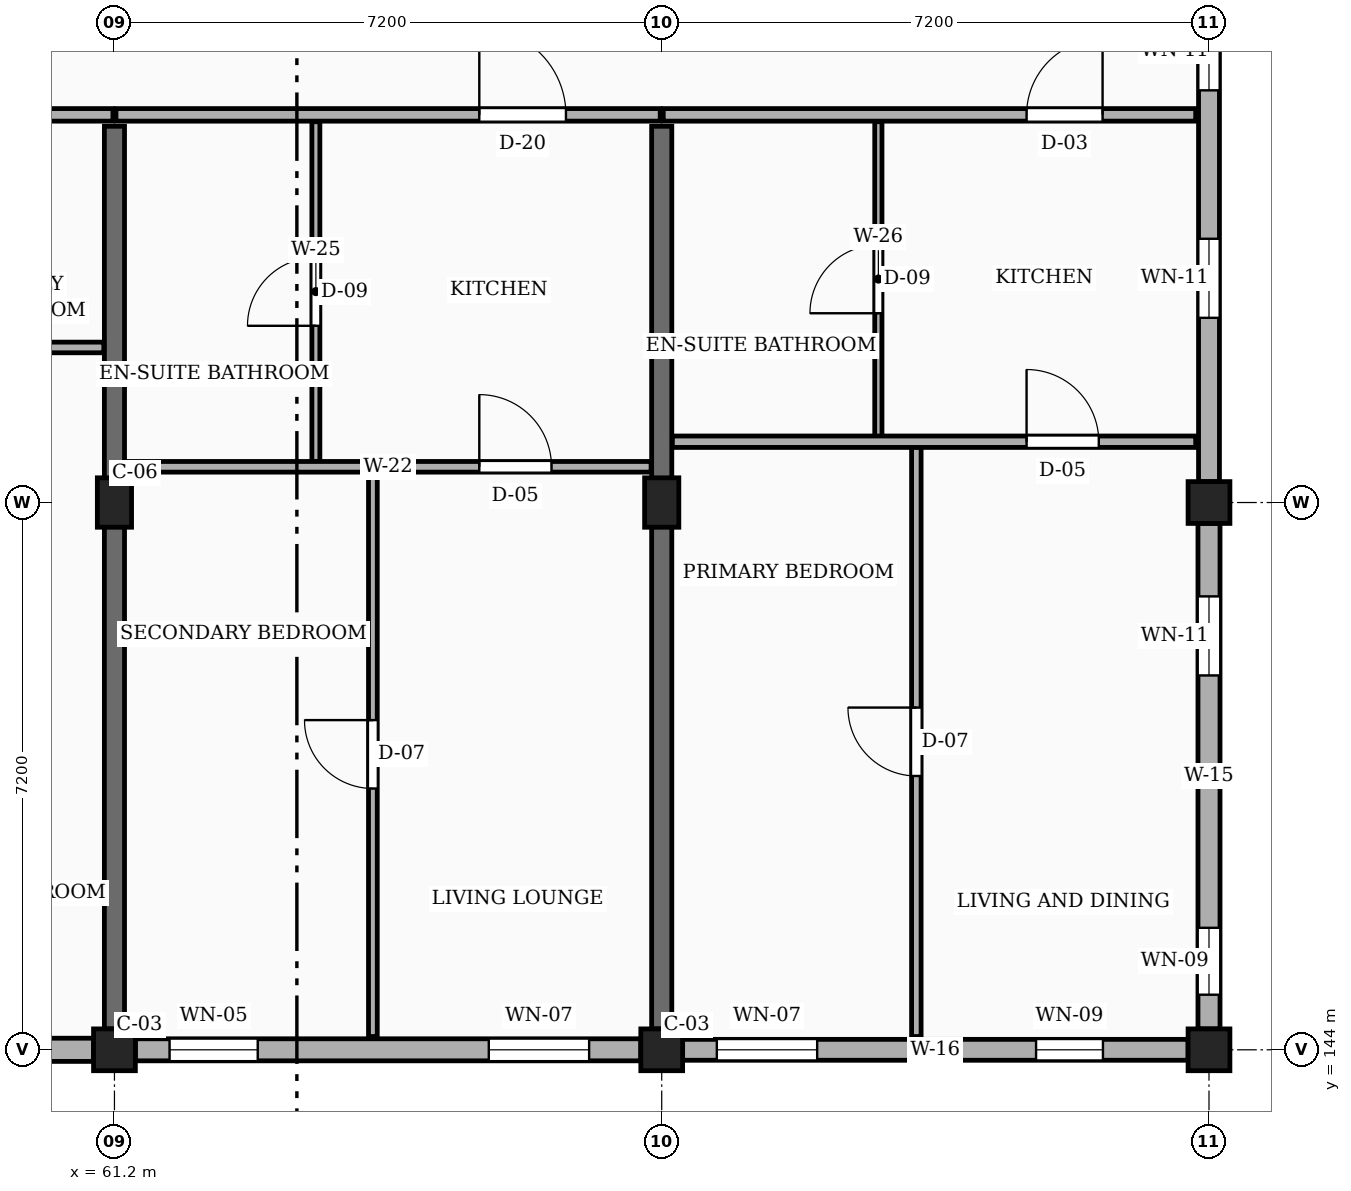
"""IFC4 building model, lengths in metres.
Left out: names, types, materials, properties, quantities, classifications, styles, units other than length and angle.
Written with IfcOpenShell. Run it as: python <this file> out.ifc"""

import sys

from ifc_helpers import new_model, si_unit, direction, frame, frame_2d, origin, origin_2d, place, context, subcontext, project, spatial, rectangle, extrude, element, fill, save


model = new_model("IFC4")
c1 = context("Model", 3, precision=1e-05, world=origin(), true_north=direction((0.0, 1.0)))
c2 = subcontext(c1, "Body", "Model", "MODEL_VIEW")
j1 = project(units=[si_unit("LENGTHUNIT", "METRE"), si_unit("PLANEANGLEUNIT", "RADIAN")], contexts=[c1])
p1 = place(None, origin())
s1 = spatial("IfcSite", under=j1, at=p1, CompositionType="ELEMENT")
p2 = place(p1, origin())
s2 = spatial("IfcBuilding", under=s1, at=p2, CompositionType="ELEMENT")
p3 = place(p2, frame((0.0, 0.0, 10.8)))
s3 = spatial("IfcBuildingStorey", under=s2, at=p3, CompositionType="ELEMENT", Elevation=10.8)
p4 = place(p3, frame((61.2, 144.0, 0.0), z_axis=(0.0, 0.0, 1.0), x_axis=(1.0, 0.0, 0.0)))
e1 = element("IfcColumn", 1, at=p4, inside=s3, PredefinedType="COLUMN", context=c2, shape_type="SweptSolid", body=[
    extrude(rectangle(XDim=0.55, YDim=0.55, at=origin_2d()), origin(), (0.0, 0.0, 1.0), 3.15),
])
p5 = place(p3, frame((61.2, 151.2, 0.0), z_axis=(0.0, 0.0, 1.0), x_axis=(1.0, 0.0, 0.0)))
e2 = element("IfcColumn", 2, at=p5, inside=s3, PredefinedType="COLUMN", context=c2, shape_type="SweptSolid", body=[
    extrude(rectangle(XDim=0.45, YDim=0.65, at=origin_2d()), origin(), (0.0, 0.0, 1.0), 3.15),
])
p6 = place(p3, frame((68.4, 144.0, 0.0), z_axis=(0.0, 0.0, 1.0), x_axis=(1.0, 0.0, 0.0)))
e3 = element("IfcColumn", 3, at=p6, inside=s3, PredefinedType="COLUMN", context=c2, shape_type="SweptSolid", body=[
    extrude(rectangle(XDim=0.55, YDim=0.55, at=origin_2d()), origin(), (0.0, 0.0, 1.0), 3.15),
])
p7 = place(p3, frame((68.4, 151.2, 0.0), z_axis=(0.0, 0.0, 1.0), x_axis=(1.0, 0.0, 0.0)))
e4 = element("IfcColumn", 4, at=p7, inside=s3, PredefinedType="COLUMN", context=c2, shape_type="SweptSolid", body=[
    extrude(rectangle(XDim=0.45, YDim=0.65, at=origin_2d()), origin(), (0.0, 0.0, 1.0), 3.15),
])
for number, where, z_axis, x_axis in (
    (5, (75.6, 144.0, 0.0), (0.0, 0.0, 1.0), (1.0, 0.0, 0.0)),
    (6, (75.6, 151.2, 0.0), (0.0, 0.0, 1.0), (1.0, 0.0, 0.0)),
):
    element("IfcColumn", number, at=place(p3, frame(where, z_axis=z_axis, x_axis=x_axis)), inside=s3, PredefinedType="COLUMN", context=c2, shape_type="SweptSolid", body=[
        extrude(rectangle(XDim=0.55, YDim=0.55, at=origin_2d()), origin(), (0.0, 0.0, 1.0), 3.15),
    ])
for number, where, z_axis, x_axis in (
    (7, (61.2, 144.275, 0.0), (0.0, 0.0, 1.0), (0.0, 1.0, 0.0)),
    (8, (68.4, 144.275, 0.0), (0.0, 0.0, 1.0), (0.0, 1.0, 0.0)),
):
    element("IfcWall", number, at=place(p3, frame(where, z_axis=z_axis, x_axis=x_axis)), inside=s3, PredefinedType="SOLIDWALL", context=c2, shape_type="SweptSolid", body=[
        extrude(rectangle(XDim=11.875, YDim=0.265, at=frame_2d((5.938, 0.0))), origin(), (0.0, 0.0, 1.0), 2.185),
    ])
p8 = place(p3, frame((54.275, 144.0, 0.0), z_axis=(0.0, 0.0, 1.0), x_axis=(1.0, 0.0, 0.0)))
e9 = element("IfcWall", 9, at=p8, inside=s3, PredefinedType="SOLIDWALL", context=c2, shape_type="SweptSolid", body=[
    extrude(rectangle(XDim=6.65, YDim=0.305, at=frame_2d((3.325, 0.0))), origin(), (0.0, 0.0, 1.0), 2.455),
])
p9 = place(p8, frame((0.45, 0.0, 0.78)))
e10 = element("IfcOpeningElement", 10, at=p9, cuts=e9, PredefinedType="OPENING", context=c2, shape_type="SweptSolid", body=[
    extrude(rectangle(XDim=1.0, YDim=1.15, at=frame_2d((0.5, 0.575))), frame((0.0, 0.163, 0.0), z_axis=(0.0, -1.0, 0.0), x_axis=(1.0, 0.0, 0.0)), (0.0, 0.0, 1.0), 0.325),
])
p10 = place(p8, frame((4.65, 0.0, 0.78)))
e11 = element("IfcOpeningElement", 11, at=p10, cuts=e9, PredefinedType="OPENING", context=c2, shape_type="SweptSolid", body=[
    extrude(rectangle(XDim=1.16, YDim=1.15, at=frame_2d((0.58, 0.575))), frame((0.0, 0.163, 0.0), z_axis=(0.0, -1.0, 0.0), x_axis=(1.0, 0.0, 0.0)), (0.0, 0.0, 1.0), 0.325),
])
p11 = place(p3, frame((61.475, 144.0, 0.0), z_axis=(0.0, 0.0, 1.0), x_axis=(1.0, 0.0, 0.0)))
e12 = element("IfcWall", 12, at=p11, inside=s3, PredefinedType="SOLIDWALL", context=c2, shape_type="SweptSolid", body=[
    extrude(rectangle(XDim=6.65, YDim=0.29, at=frame_2d((3.325, 0.0))), origin(), (0.0, 0.0, 1.0), 2.455),
])
p12 = place(p11, frame((0.45, 0.0, 0.78)))
e13 = element("IfcOpeningElement", 13, at=p12, cuts=e12, PredefinedType="OPENING", context=c2, shape_type="SweptSolid", body=[
    extrude(rectangle(XDim=1.16, YDim=1.15, at=frame_2d((0.58, 0.575))), frame((0.0, 0.155, 0.0), z_axis=(0.0, -1.0, 0.0), x_axis=(1.0, 0.0, 0.0)), (0.0, 0.0, 1.0), 0.31),
])
p13 = place(p11, frame((4.65, 0.0, 0.78)))
e14 = element("IfcOpeningElement", 14, at=p13, cuts=e12, PredefinedType="OPENING", context=c2, shape_type="SweptSolid", body=[
    extrude(rectangle(XDim=1.32, YDim=1.15, at=frame_2d((0.66, 0.575))), frame((0.0, 0.155, 0.0), z_axis=(0.0, -1.0, 0.0), x_axis=(1.0, 0.0, 0.0)), (0.0, 0.0, 1.0), 0.31),
])
p14 = place(p3, frame((68.675, 144.0, 0.0), z_axis=(0.0, 0.0, 1.0), x_axis=(1.0, 0.0, 0.0)))
e15 = element("IfcWall", 15, at=p14, inside=s3, PredefinedType="SOLIDWALL", context=c2, shape_type="SweptSolid", body=[
    extrude(rectangle(XDim=6.65, YDim=0.275, at=frame_2d((3.325, 0.0))), origin(), (0.0, 0.0, 1.0), 2.455),
])
p15 = place(p14, frame((0.45, 0.0, 0.78)))
e16 = element("IfcOpeningElement", 16, at=p15, cuts=e15, PredefinedType="OPENING", context=c2, shape_type="SweptSolid", body=[
    extrude(rectangle(XDim=1.32, YDim=1.15, at=frame_2d((0.66, 0.575))), frame((0.0, 0.147, 0.0), z_axis=(0.0, -1.0, 0.0), x_axis=(1.0, 0.0, 0.0)), (0.0, 0.0, 1.0), 0.295),
])
p16 = place(p14, frame((4.65, 0.0, 0.78)))
e17 = element("IfcOpeningElement", 17, at=p16, cuts=e15, PredefinedType="OPENING", context=c2, shape_type="SweptSolid", body=[
    extrude(rectangle(XDim=0.88, YDim=1.26, at=frame_2d((0.44, 0.63))), frame((0.0, 0.147, 0.0), z_axis=(0.0, -1.0, 0.0), x_axis=(1.0, 0.0, 0.0)), (0.0, 0.0, 1.0), 0.295),
])
p17 = place(p3, frame((75.6, 144.275, 0.0), z_axis=(0.0, 0.0, 1.0), x_axis=(0.0, 1.0, 0.0)))
e18 = element("IfcWall", 18, at=p17, inside=s3, PredefinedType="SOLIDWALL", context=c2, shape_type="SweptSolid", body=[
    extrude(rectangle(XDim=6.65, YDim=0.29, at=frame_2d((3.325, 0.0))), origin(), (0.0, 0.0, 1.0), 2.455),
])
p18 = place(p17, frame((0.45, 0.0, 0.78)))
e19 = element("IfcOpeningElement", 19, at=p18, cuts=e18, PredefinedType="OPENING", context=c2, shape_type="SweptSolid", body=[
    extrude(rectangle(XDim=0.88, YDim=1.26, at=frame_2d((0.44, 0.63))), frame((0.0, 0.155, 0.0), z_axis=(0.0, -1.0, 0.0), x_axis=(1.0, 0.0, 0.0)), (0.0, 0.0, 1.0), 0.31),
])
p19 = place(p17, frame((4.65, 0.0, 0.78)))
e20 = element("IfcOpeningElement", 20, at=p19, cuts=e18, PredefinedType="OPENING", context=c2, shape_type="SweptSolid", body=[
    extrude(rectangle(XDim=1.04, YDim=1.26, at=frame_2d((0.52, 0.63))), frame((0.0, 0.155, 0.0), z_axis=(0.0, -1.0, 0.0), x_axis=(1.0, 0.0, 0.0)), (0.0, 0.0, 1.0), 0.31),
])
p20 = place(p3, frame((75.6, 151.475, 0.0), z_axis=(0.0, 0.0, 1.0), x_axis=(0.0, 1.0, 0.0)))
e21 = element("IfcWall", 21, at=p20, inside=s3, PredefinedType="SOLIDWALL", context=c2, shape_type="SweptSolid", body=[
    extrude(rectangle(XDim=6.65, YDim=0.275, at=frame_2d((3.325, 0.0))), origin(), (0.0, 0.0, 1.0), 2.455),
])
p21 = place(p20, frame((2.155, 0.0, 0.78)))
e22 = element("IfcOpeningElement", 22, at=p21, cuts=e21, PredefinedType="OPENING", context=c2, shape_type="SweptSolid", body=[
    extrude(rectangle(XDim=1.04, YDim=1.26, at=frame_2d((0.52, 0.63))), frame((0.0, 0.147, 0.0), z_axis=(0.0, -1.0, 0.0), x_axis=(1.0, 0.0, 0.0)), (0.0, 0.0, 1.0), 0.295),
])
p22 = place(p20, frame((5.147, 0.0, 0.78)))
e23 = element("IfcOpeningElement", 23, at=p22, cuts=e21, PredefinedType="OPENING", context=c2, shape_type="SweptSolid", body=[
    extrude(rectangle(XDim=1.04, YDim=1.26, at=frame_2d((0.52, 0.63))), frame((0.0, 0.147, 0.0), z_axis=(0.0, -1.0, 0.0), x_axis=(1.0, 0.0, 0.0)), (0.0, 0.0, 1.0), 0.295),
])
p23 = place(p3, frame((54.02, 156.3, 0.0), z_axis=(0.0, 0.0, 1.0), x_axis=(1.0, 0.0, 0.0)))
e24 = element("IfcWall", 24, at=p23, inside=s3, PredefinedType="PARTITIONING", context=c2, shape_type="SweptSolid", body=[
    extrude(rectangle(XDim=7.16, YDim=0.165, at=frame_2d((3.58, 0.0))), origin(), (0.0, 0.0, 1.0), 2.32),
])
p24 = place(p23, frame((1.33, 0.0, 0.0)))
e25 = element("IfcOpeningElement", 25, at=p24, cuts=e24, PredefinedType="OPENING", context=c2, shape_type="SweptSolid", body=[
    extrude(rectangle(XDim=0.94, YDim=2.12, at=frame_2d((0.47, 1.06))), frame((0.0, 0.093, 0.0), z_axis=(0.0, -1.0, 0.0), x_axis=(1.0, 0.0, 0.0)), (0.0, 0.0, 1.0), 0.185),
])
p25 = place(p3, frame((61.22, 156.3, 0.0), z_axis=(0.0, 0.0, 1.0), x_axis=(1.0, 0.0, 0.0)))
e26 = element("IfcWall", 26, at=p25, inside=s3, PredefinedType="PARTITIONING", context=c2, shape_type="SweptSolid", body=[
    extrude(rectangle(XDim=7.16, YDim=0.165, at=frame_2d((3.58, 0.0))), origin(), (0.0, 0.0, 1.0), 2.32),
])
p26 = place(p25, frame((4.78, 0.0, 0.0)))
e27 = element("IfcOpeningElement", 27, at=p26, cuts=e26, PredefinedType="OPENING", context=c2, shape_type="SweptSolid", body=[
    extrude(rectangle(XDim=1.14, YDim=2.18, at=frame_2d((0.57, 1.09))), frame((0.0, 0.093, 0.0), z_axis=(0.0, -1.0, 0.0), x_axis=(1.0, 0.0, 0.0)), (0.0, 0.0, 1.0), 0.185),
])
p27 = place(p3, frame((68.42, 156.3, 0.0), z_axis=(0.0, 0.0, 1.0), x_axis=(1.0, 0.0, 0.0)))
e28 = element("IfcWall", 28, at=p27, inside=s3, PredefinedType="PARTITIONING", context=c2, shape_type="SweptSolid", body=[
    extrude(rectangle(XDim=7.005, YDim=0.165, at=frame_2d((3.502, 0.0))), origin(), (0.0, 0.0, 1.0), 2.32),
])
p28 = place(p27, frame((4.78, 0.0, 0.0)))
e29 = element("IfcOpeningElement", 29, at=p28, cuts=e28, PredefinedType="OPENING", context=c2, shape_type="SweptSolid", body=[
    extrude(rectangle(XDim=1.0, YDim=2.15, at=frame_2d((0.5, 1.075))), frame((0.0, 0.093, 0.0), z_axis=(0.0, -1.0, 0.0), x_axis=(1.0, 0.0, 0.0)), (0.0, 0.0, 1.0), 0.185),
])
p29 = place(p3, frame((54.14, 153.24, 0.0), z_axis=(0.0, 0.0, 1.0), x_axis=(1.0, 0.0, 0.0)))
e30 = element("IfcWall", 30, at=p29, inside=s3, PredefinedType="PARTITIONING", context=c2, shape_type="SweptSolid", body=[
    extrude(rectangle(XDim=6.92, YDim=0.14, at=frame_2d((3.46, 0.0))), origin(), (0.0, 0.0, 1.0), 2.32),
])
p30 = place(p29, frame((1.31, 0.0, 0.0)))
e31 = element("IfcOpeningElement", 31, at=p30, cuts=e30, PredefinedType="OPENING", context=c2, shape_type="SweptSolid", body=[
    extrude(rectangle(XDim=0.92, YDim=2.1, at=frame_2d((0.46, 1.05))), frame((0.0, 0.08, 0.0), z_axis=(0.0, -1.0, 0.0), x_axis=(1.0, 0.0, 0.0)), (0.0, 0.0, 1.0), 0.16),
])
p31 = place(p3, frame((64.6, 144.175, 0.0), z_axis=(0.0, 0.0, 1.0), x_axis=(0.0, 1.0, 0.0)))
e32 = element("IfcWall", 32, at=p31, inside=s3, PredefinedType="PARTITIONING", context=c2, shape_type="SweptSolid", body=[
    extrude(rectangle(XDim=7.425, YDim=0.115, at=frame_2d((3.712, 0.0))), origin(), (0.0, 0.0, 1.0), 2.32),
])
p32 = place(p31, frame((3.262, 0.0, 0.0)))
e33 = element("IfcOpeningElement", 33, at=p32, cuts=e32, PredefinedType="OPENING", context=c2, shape_type="SweptSolid", body=[
    extrude(rectangle(XDim=0.9, YDim=2.1, at=frame_2d((0.45, 1.05))), frame((0.0, 0.067, 0.0), z_axis=(0.0, -1.0, 0.0), x_axis=(1.0, 0.0, 0.0)), (0.0, 0.0, 1.0), 0.135),
])
p33 = place(p3, frame((63.85, 151.74, 0.0), z_axis=(0.0, 0.0, 1.0), x_axis=(0.0, 1.0, 0.0)))
e34 = element("IfcWall", 34, at=p33, inside=s3, PredefinedType="PARTITIONING", context=c2, shape_type="SweptSolid", body=[
    extrude(rectangle(XDim=4.47, YDim=0.105, at=frame_2d((2.235, 0.0))), origin(), (0.0, 0.0, 1.0), 2.32),
])
p34 = place(p33, frame((1.785, 0.0, 0.0)))
e35 = element("IfcOpeningElement", 35, at=p34, cuts=e34, PredefinedType="OPENING", context=c2, shape_type="SweptSolid", body=[
    extrude(rectangle(XDim=0.9, YDim=2.05, at=frame_2d((0.45, 1.025))), frame((0.0, 0.062, 0.0), z_axis=(0.0, -1.0, 0.0), x_axis=(1.0, 0.0, 0.0)), (0.0, 0.0, 1.0), 0.125),
])
p35 = place(p3, frame((61.34, 151.67, 0.0), z_axis=(0.0, 0.0, 1.0), x_axis=(1.0, 0.0, 0.0)))
e36 = element("IfcWall", 36, at=p35, inside=s3, PredefinedType="PARTITIONING", context=c2, shape_type="SweptSolid", body=[
    extrude(rectangle(XDim=6.92, YDim=0.14, at=frame_2d((3.46, 0.0))), origin(), (0.0, 0.0, 1.0), 2.32),
])
p36 = place(p35, frame((4.66, 0.0, 0.0)))
e37 = element("IfcOpeningElement", 37, at=p36, cuts=e36, PredefinedType="OPENING", context=c2, shape_type="SweptSolid", body=[
    extrude(rectangle(XDim=0.95, YDim=2.1, at=frame_2d((0.475, 1.05))), frame((0.0, 0.08, 0.0), z_axis=(0.0, -1.0, 0.0), x_axis=(1.0, 0.0, 0.0)), (0.0, 0.0, 1.0), 0.16),
])
p37 = place(p3, frame((71.75, 144.175, 0.0), z_axis=(0.0, 0.0, 1.0), x_axis=(0.0, 1.0, 0.0)))
e38 = element("IfcWall", 38, at=p37, inside=s3, PredefinedType="PARTITIONING", context=c2, shape_type="SweptSolid", body=[
    extrude(rectangle(XDim=7.755, YDim=0.125, at=frame_2d((3.877, 0.0))), origin(), (0.0, 0.0, 1.0), 2.32),
])
p38 = place(p37, frame((3.427, 0.0, 0.0)))
e39 = element("IfcOpeningElement", 39, at=p38, cuts=e38, PredefinedType="OPENING", context=c2, shape_type="SweptSolid", body=[
    extrude(rectangle(XDim=0.9, YDim=2.1, at=frame_2d((0.45, 1.05))), frame((0.0, 0.073, 0.0), z_axis=(0.0, -1.0, 0.0), x_axis=(1.0, 0.0, 0.0)), (0.0, 0.0, 1.0), 0.145),
])
p39 = place(p3, frame((71.25, 152.07, 0.0), z_axis=(0.0, 0.0, 1.0), x_axis=(0.0, 1.0, 0.0)))
e40 = element("IfcWall", 40, at=p39, inside=s3, PredefinedType="PARTITIONING", context=c2, shape_type="SweptSolid", body=[
    extrude(rectangle(XDim=4.14, YDim=0.095, at=frame_2d((2.07, 0.0))), origin(), (0.0, 0.0, 1.0), 2.32),
])
p40 = place(p39, frame((1.62, 0.0, 0.0)))
e41 = element("IfcOpeningElement", 41, at=p40, cuts=e40, PredefinedType="OPENING", context=c2, shape_type="SweptSolid", body=[
    extrude(rectangle(XDim=0.9, YDim=2.05, at=frame_2d((0.45, 1.025))), frame((0.0, 0.058, 0.0), z_axis=(0.0, -1.0, 0.0), x_axis=(1.0, 0.0, 0.0)), (0.0, 0.0, 1.0), 0.115),
])
p41 = place(p3, frame((68.54, 152.0, 0.0), z_axis=(0.0, 0.0, 1.0), x_axis=(1.0, 0.0, 0.0)))
e42 = element("IfcWall", 42, at=p41, inside=s3, PredefinedType="PARTITIONING", context=c2, shape_type="SweptSolid", body=[
    extrude(rectangle(XDim=6.885, YDim=0.15, at=frame_2d((3.442, 0.0))), origin(), (0.0, 0.0, 1.0), 2.32),
])
p42 = place(p41, frame((4.66, 0.0, 0.0)))
e43 = element("IfcOpeningElement", 43, at=p42, cuts=e42, PredefinedType="OPENING", context=c2, shape_type="SweptSolid", body=[
    extrude(rectangle(XDim=0.95, YDim=2.1, at=frame_2d((0.475, 1.05))), frame((0.0, 0.085, 0.0), z_axis=(0.0, -1.0, 0.0), x_axis=(1.0, 0.0, 0.0)), (0.0, 0.0, 1.0), 0.17),
])
p43 = place(p12, origin())
e44 = element("IfcWindow", 44, at=p43, inside=s3, PartitioningType="SINGLE_PANEL", PredefinedType="WINDOW", context=c2, shape_type="SweptSolid", body=[
    extrude(rectangle(XDim=1.16, YDim=1.15, at=frame_2d((0.58, 0.575))), frame((0.0, 0.03, 0.0), z_axis=(0.0, -1.0, 0.0), x_axis=(1.0, 0.0, 0.0)), (0.0, 0.0, 1.0), 0.06),
])
fill(e13, e44)
p44 = place(p13, origin())
e45 = element("IfcWindow", 45, at=p44, inside=s3, PartitioningType="SINGLE_PANEL", PredefinedType="WINDOW", context=c2, shape_type="SweptSolid", body=[
    extrude(rectangle(XDim=1.32, YDim=1.15, at=frame_2d((0.66, 0.575))), frame((0.0, 0.03, 0.0), z_axis=(0.0, -1.0, 0.0), x_axis=(1.0, 0.0, 0.0)), (0.0, 0.0, 1.0), 0.06),
])
fill(e14, e45)
p45 = place(p15, origin())
e46 = element("IfcWindow", 46, at=p45, inside=s3, PartitioningType="SINGLE_PANEL", PredefinedType="WINDOW", context=c2, shape_type="SweptSolid", body=[
    extrude(rectangle(XDim=1.32, YDim=1.15, at=frame_2d((0.66, 0.575))), frame((0.0, 0.03, 0.0), z_axis=(0.0, -1.0, 0.0), x_axis=(1.0, 0.0, 0.0)), (0.0, 0.0, 1.0), 0.06),
])
fill(e16, e46)
p46 = place(p16, origin())
e47 = element("IfcWindow", 47, at=p46, inside=s3, PartitioningType="SINGLE_PANEL", PredefinedType="WINDOW", context=c2, shape_type="SweptSolid", body=[
    extrude(rectangle(XDim=0.88, YDim=1.26, at=frame_2d((0.44, 0.63))), frame((0.0, 0.03, 0.0), z_axis=(0.0, -1.0, 0.0), x_axis=(1.0, 0.0, 0.0)), (0.0, 0.0, 1.0), 0.06),
])
fill(e17, e47)
p47 = place(p18, origin())
e48 = element("IfcWindow", 48, at=p47, inside=s3, PartitioningType="SINGLE_PANEL", PredefinedType="WINDOW", context=c2, shape_type="SweptSolid", body=[
    extrude(rectangle(XDim=0.88, YDim=1.26, at=frame_2d((0.44, 0.63))), frame((0.0, 0.03, 0.0), z_axis=(0.0, -1.0, 0.0), x_axis=(1.0, 0.0, 0.0)), (0.0, 0.0, 1.0), 0.06),
])
fill(e19, e48)
p48 = place(p19, origin())
e49 = element("IfcWindow", 49, at=p48, inside=s3, PartitioningType="SINGLE_PANEL", PredefinedType="WINDOW", context=c2, shape_type="SweptSolid", body=[
    extrude(rectangle(XDim=1.04, YDim=1.26, at=frame_2d((0.52, 0.63))), frame((0.0, 0.03, 0.0), z_axis=(0.0, -1.0, 0.0), x_axis=(1.0, 0.0, 0.0)), (0.0, 0.0, 1.0), 0.06),
])
fill(e20, e49)
p49 = place(p21, origin())
e50 = element("IfcWindow", 50, at=p49, inside=s3, PartitioningType="SINGLE_PANEL", PredefinedType="WINDOW", context=c2, shape_type="SweptSolid", body=[
    extrude(rectangle(XDim=1.04, YDim=1.26, at=frame_2d((0.52, 0.63))), frame((0.0, 0.03, 0.0), z_axis=(0.0, -1.0, 0.0), x_axis=(1.0, 0.0, 0.0)), (0.0, 0.0, 1.0), 0.06),
])
fill(e22, e50)
p50 = place(p22, origin())
e51 = element("IfcWindow", 51, at=p50, inside=s3, PartitioningType="SINGLE_PANEL", PredefinedType="WINDOW", context=c2, shape_type="SweptSolid", body=[
    extrude(rectangle(XDim=1.04, YDim=1.26, at=frame_2d((0.52, 0.63))), frame((0.0, 0.03, 0.0), z_axis=(0.0, -1.0, 0.0), x_axis=(1.0, 0.0, 0.0)), (0.0, 0.0, 1.0), 0.06),
])
fill(e23, e51)
p51 = place(p26, origin())
e52 = element("IfcDoor", 52, at=p51, inside=s3, OperationType="SINGLE_SWING_LEFT", PredefinedType="DOOR", context=c2, shape_type="SweptSolid", body=[
    extrude(rectangle(XDim=1.14, YDim=2.18, at=frame_2d((0.57, 1.09))), frame((0.0, 0.025, 0.0), z_axis=(0.0, -1.0, 0.0), x_axis=(1.0, 0.0, 0.0)), (0.0, 0.0, 1.0), 0.05),
])
fill(e27, e52)
p52 = place(p28, origin())
e53 = element("IfcDoor", 53, at=p52, inside=s3, OperationType="SINGLE_SWING_RIGHT", PredefinedType="DOOR", context=c2, shape_type="SweptSolid", body=[
    extrude(rectangle(XDim=1.0, YDim=2.15, at=frame_2d((0.5, 1.075))), frame((0.0, 0.025, 0.0), z_axis=(0.0, -1.0, 0.0), x_axis=(1.0, 0.0, 0.0)), (0.0, 0.0, 1.0), 0.05),
])
fill(e29, e53)
p53 = place(p32, origin())
e54 = element("IfcDoor", 54, at=p53, inside=s3, OperationType="SINGLE_SWING_RIGHT", PredefinedType="DOOR", context=c2, shape_type="SweptSolid", body=[
    extrude(rectangle(XDim=0.9, YDim=2.1, at=frame_2d((0.45, 1.05))), frame((0.0, 0.025, 0.0), z_axis=(0.0, -1.0, 0.0), x_axis=(1.0, 0.0, 0.0)), (0.0, 0.0, 1.0), 0.05),
])
fill(e33, e54)
p54 = place(p34, origin())
e55 = element("IfcDoor", 55, at=p54, inside=s3, OperationType="SINGLE_SWING_LEFT", PredefinedType="DOOR", context=c2, shape_type="SweptSolid", body=[
    extrude(rectangle(XDim=0.9, YDim=2.05, at=frame_2d((0.45, 1.025))), frame((0.0, 0.025, 0.0), z_axis=(0.0, -1.0, 0.0), x_axis=(1.0, 0.0, 0.0)), (0.0, 0.0, 1.0), 0.05),
])
fill(e35, e55)
p55 = place(p36, origin())
e56 = element("IfcDoor", 56, at=p55, inside=s3, OperationType="SINGLE_SWING_LEFT", PredefinedType="DOOR", context=c2, shape_type="SweptSolid", body=[
    extrude(rectangle(XDim=0.95, YDim=2.1, at=frame_2d((0.475, 1.05))), frame((0.0, 0.025, 0.0), z_axis=(0.0, -1.0, 0.0), x_axis=(1.0, 0.0, 0.0)), (0.0, 0.0, 1.0), 0.05),
])
fill(e37, e56)
p56 = place(p38, origin())
e57 = element("IfcDoor", 57, at=p56, inside=s3, OperationType="SINGLE_SWING_RIGHT", PredefinedType="DOOR", context=c2, shape_type="SweptSolid", body=[
    extrude(rectangle(XDim=0.9, YDim=2.1, at=frame_2d((0.45, 1.05))), frame((0.0, 0.025, 0.0), z_axis=(0.0, -1.0, 0.0), x_axis=(1.0, 0.0, 0.0)), (0.0, 0.0, 1.0), 0.05),
])
fill(e39, e57)
p57 = place(p40, origin())
e58 = element("IfcDoor", 58, at=p57, inside=s3, OperationType="SINGLE_SWING_LEFT", PredefinedType="DOOR", context=c2, shape_type="SweptSolid", body=[
    extrude(rectangle(XDim=0.9, YDim=2.05, at=frame_2d((0.45, 1.025))), frame((0.0, 0.025, 0.0), z_axis=(0.0, -1.0, 0.0), x_axis=(1.0, 0.0, 0.0)), (0.0, 0.0, 1.0), 0.05),
])
fill(e41, e58)
p58 = place(p42, origin())
e59 = element("IfcDoor", 59, at=p58, inside=s3, OperationType="SINGLE_SWING_LEFT", PredefinedType="DOOR", context=c2, shape_type="SweptSolid", body=[
    extrude(rectangle(XDim=0.95, YDim=2.1, at=frame_2d((0.475, 1.05))), frame((0.0, 0.025, 0.0), z_axis=(0.0, -1.0, 0.0), x_axis=(1.0, 0.0, 0.0)), (0.0, 0.0, 1.0), 0.05),
])
fill(e43, e59)
save(model, sys.argv[1])
